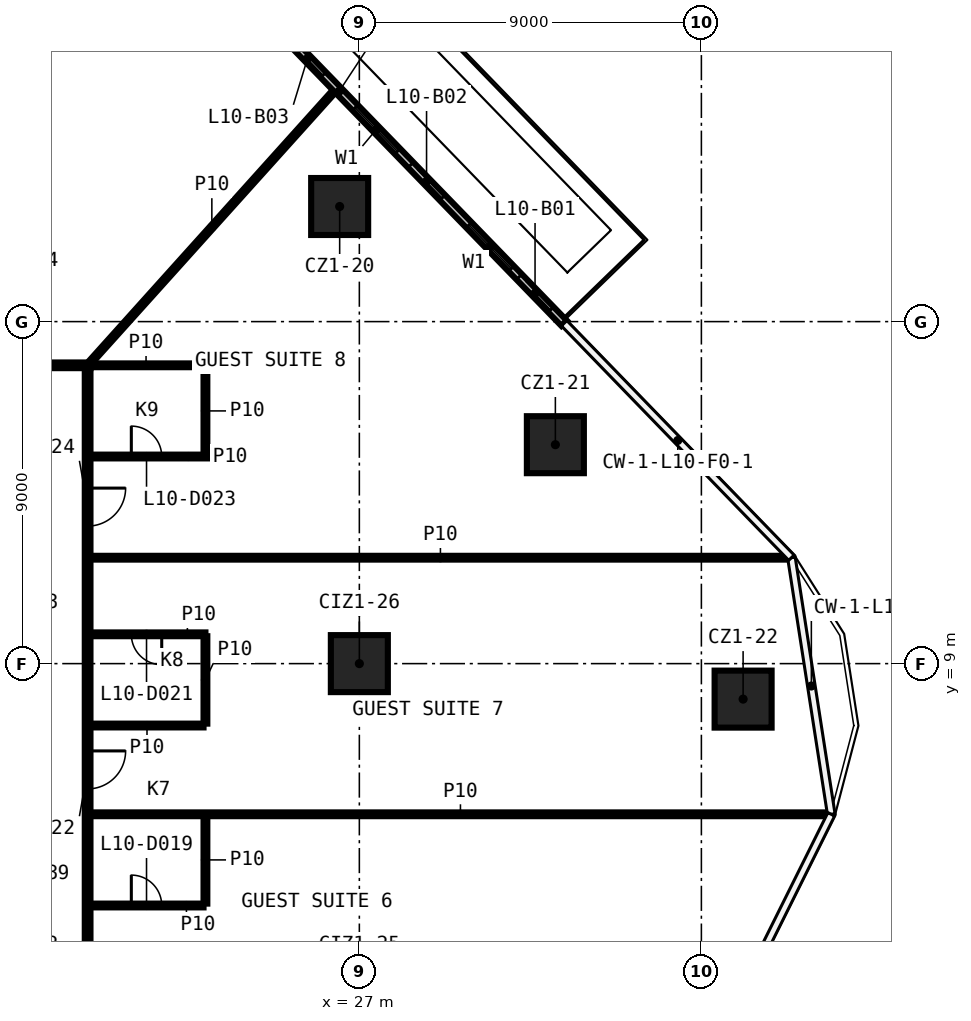
"""IFC4 building model, lengths in metres.
Left out: names, types, materials, properties, quantities, classifications, styles, units other than length and angle.
Written with IfcOpenShell. Run it as: python <this file> out.ifc"""

import sys

from ifc_helpers import new_model, si_unit, direction, frame, frame_2d, origin, origin_2d, place, context, subcontext, project, spatial, rectangle, extrude, element, fill, save


model = new_model("IFC4")
c1 = context("Model", 3, precision=1e-05, world=origin(), true_north=direction((0.0, 1.0)))
c2 = subcontext(c1, "Body", "Model", "MODEL_VIEW")
j1 = project(units=[si_unit("LENGTHUNIT", "METRE"), si_unit("PLANEANGLEUNIT", "RADIAN")], contexts=[c1])
p1 = place(None, origin())
s1 = spatial("IfcSite", under=j1, at=p1, CompositionType="ELEMENT")
p2 = place(p1, origin())
s2 = spatial("IfcBuilding", under=s1, at=p2, CompositionType="ELEMENT")
p3 = place(p2, frame((0.0, 0.0, 58.8)))
s3 = spatial("IfcBuildingStorey", under=s2, at=p3, CompositionType="ELEMENT", Elevation=58.8)
for number, where, z_axis, x_axis in (
    (1, (26.482, 21.029, 0.0), (0.0, 0.0, 1.0), (1.0, 0.0, 0.0)),
    (2, (32.158, 14.761, 0.0), (0.0, 0.0, 1.0), (1.0, 0.0, 0.0)),
    (3, (37.098, 8.066, 0.0), (0.0, 0.0, 1.0), (1.0, 0.0, 0.0)),
    (4, (27.0, 9.0, 0.0), (0.0, 0.0, 1.0), (1.0, 0.0, 0.0)),
):
    element("IfcColumn", number, at=place(p3, frame(where, z_axis=z_axis, x_axis=x_axis)), inside=s3, PredefinedType="COLUMN", context=c2, shape_type="SweptSolid", body=[
        extrude(rectangle(XDim=1.5, YDim=1.5, at=origin_2d()), origin(), (0.0, 0.0, 1.0), 3.3),
    ])
p4 = place(p3, frame((19.925, 2.635, 0.0), z_axis=(0.0, 0.0, 1.0), x_axis=(1.0, 0.0, 0.0)))
e5 = element("IfcWall", 5, at=p4, inside=s3, PredefinedType="PARTITIONING", context=c2, shape_type="SweptSolid", body=[
    extrude(rectangle(XDim=2.975, YDim=0.1, at=frame_2d((1.487, 0.0))), origin(), (0.0, 0.0, 1.0), 3.3),
])
p5 = place(p4, frame((1.075, 0.0, 0.0)))
e6 = element("IfcOpeningElement", 6, at=p5, cuts=e5, PredefinedType="OPENING", context=c2, shape_type="SweptSolid", body=[
    extrude(rectangle(XDim=0.8, YDim=2.1, at=frame_2d((0.4, 1.05))), frame((0.0, 0.06, 0.0), z_axis=(0.0, -1.0, 0.0), x_axis=(1.0, 0.0, 0.0)), (0.0, 0.0, 1.0), 0.12),
])
p6 = place(p3, frame((19.925, 5.035, 0.0), z_axis=(0.0, 0.0, 1.0), x_axis=(1.0, 0.0, 0.0)))
e7 = element("IfcWall", 7, at=p6, inside=s3, PredefinedType="PARTITIONING", context=c2, shape_type="SweptSolid", body=[
    extrude(rectangle(XDim=19.47, YDim=0.1, at=frame_2d((9.735, 0.0))), origin(), (0.0, 0.0, 1.0), 3.3),
])
p7 = place(p3, frame((19.925, 7.371, 0.0), z_axis=(0.0, 0.0, 1.0), x_axis=(1.0, 0.0, 0.0)))
e8 = element("IfcWall", 8, at=p7, inside=s3, PredefinedType="PARTITIONING", context=c2, shape_type="SweptSolid", body=[
    extrude(rectangle(XDim=2.975, YDim=0.1, at=frame_2d((1.487, 0.0))), origin(), (0.0, 0.0, 1.0), 3.3),
])
p8 = place(p3, frame((22.95, 9.771, 0.0), z_axis=(0.0, 0.0, 1.0), x_axis=(-1.0, 0.0, 0.0)))
e9 = element("IfcWall", 9, at=p8, inside=s3, PredefinedType="PARTITIONING", context=c2, shape_type="SweptSolid", body=[
    extrude(rectangle(XDim=3.025, YDim=0.1, at=frame_2d((1.512, 0.0))), origin(), (0.0, 0.0, 1.0), 3.3),
])
p9 = place(p8, frame((1.15, 0.0, 0.0)))
e10 = element("IfcOpeningElement", 10, at=p9, cuts=e9, PredefinedType="OPENING", context=c2, shape_type="SweptSolid", body=[
    extrude(rectangle(XDim=0.8, YDim=2.1, at=frame_2d((0.4, 1.05))), frame((0.0, 0.06, 0.0), z_axis=(0.0, -1.0, 0.0), x_axis=(1.0, 0.0, 0.0)), (0.0, 0.0, 1.0), 0.12),
])
p10 = place(p3, frame((19.925, 11.787, 0.0), z_axis=(0.0, 0.0, 1.0), x_axis=(1.0, 0.0, 0.0)))
e11 = element("IfcWall", 11, at=p10, inside=s3, PredefinedType="PARTITIONING", context=c2, shape_type="SweptSolid", body=[
    extrude(rectangle(XDim=18.417, YDim=0.1, at=frame_2d((9.208, 0.0))), origin(), (0.0, 0.0, 1.0), 3.3),
])
p11 = place(p3, frame((19.925, 14.45, 0.0), z_axis=(0.0, 0.0, 1.0), x_axis=(1.0, 0.0, 0.0)))
e12 = element("IfcWall", 12, at=p11, inside=s3, PredefinedType="PARTITIONING", context=c2, shape_type="SweptSolid", body=[
    extrude(rectangle(XDim=3.075, YDim=0.1, at=frame_2d((1.538, 0.0))), origin(), (0.0, 0.0, 1.0), 3.3),
])
p12 = place(p11, frame((1.075, 0.0, 0.0)))
e13 = element("IfcOpeningElement", 13, at=p12, cuts=e12, PredefinedType="OPENING", context=c2, shape_type="SweptSolid", body=[
    extrude(rectangle(XDim=0.8, YDim=2.1, at=frame_2d((0.4, 1.05))), frame((0.0, 0.06, 0.0), z_axis=(0.0, -1.0, 0.0), x_axis=(1.0, 0.0, 0.0)), (0.0, 0.0, 1.0), 0.12),
])
p13 = place(p3, frame((-19.925, 16.85, 0.0), z_axis=(0.0, 0.0, 1.0), x_axis=(1.0, 0.0, 0.0)))
e14 = element("IfcWall", 14, at=p13, inside=s3, PredefinedType="PARTITIONING", context=c2, shape_type="SweptSolid", body=[
    extrude(rectangle(XDim=39.85, YDim=0.15, at=frame_2d((19.925, 0.0))), origin(), (0.0, 0.0, 1.0), 3.3),
])
p14 = place(p13, frame((31.433, 0.0, 0.0)))
e15 = element("IfcOpeningElement", 15, at=p14, cuts=e14, PredefinedType="OPENING", context=c2, shape_type="SweptSolid", body=[
    extrude(rectangle(XDim=0.9, YDim=2.1, at=frame_2d((0.45, 1.05))), frame((0.0, 0.085, 0.0), z_axis=(0.0, -1.0, 0.0), x_axis=(1.0, 0.0, 0.0)), (0.0, 0.0, 1.0), 0.17),
])
p15 = place(p13, frame((22.043, 0.0, 0.0)))
e16 = element("IfcOpeningElement", 16, at=p15, cuts=e14, PredefinedType="OPENING", context=c2, shape_type="SweptSolid", body=[
    extrude(rectangle(XDim=0.9, YDim=2.1, at=frame_2d((0.45, 1.05))), frame((0.0, 0.085, 0.0), z_axis=(0.0, -1.0, 0.0), x_axis=(1.0, 0.0, 0.0)), (0.0, 0.0, 1.0), 0.17),
])
p16 = place(p13, frame((16.957, 0.0, 0.0)))
e17 = element("IfcOpeningElement", 17, at=p16, cuts=e14, PredefinedType="OPENING", context=c2, shape_type="SweptSolid", body=[
    extrude(rectangle(XDim=0.9, YDim=2.1, at=frame_2d((0.45, 1.05))), frame((0.0, 0.085, 0.0), z_axis=(0.0, -1.0, 0.0), x_axis=(1.0, 0.0, 0.0)), (0.0, 0.0, 1.0), 0.17),
])
p17 = place(p13, frame((13.572, 0.0, 0.0)))
e18 = element("IfcOpeningElement", 18, at=p17, cuts=e14, PredefinedType="OPENING", context=c2, shape_type="SweptSolid", body=[
    extrude(rectangle(XDim=0.9, YDim=2.1, at=frame_2d((0.45, 1.05))), frame((0.0, 0.085, 0.0), z_axis=(0.0, -1.0, 0.0), x_axis=(1.0, 0.0, 0.0)), (0.0, 0.0, 1.0), 0.17),
])
p18 = place(p13, frame((7.458, 0.0, 0.0)))
e19 = element("IfcOpeningElement", 19, at=p18, cuts=e14, PredefinedType="OPENING", context=c2, shape_type="SweptSolid", body=[
    extrude(rectangle(XDim=1.0, YDim=2.1, at=frame_2d((0.5, 1.05))), frame((0.0, 0.085, 0.0), z_axis=(0.0, -1.0, 0.0), x_axis=(1.0, 0.0, 0.0)), (0.0, 0.0, 1.0), 0.17),
])
p19 = place(p3, frame((19.775, 16.85, 0.0), z_axis=(0.0, 0.0, 1.0), x_axis=(1.0, 0.0, 0.0)))
e20 = element("IfcWall", 20, at=p19, inside=s3, PredefinedType="PARTITIONING", context=c2, shape_type="SweptSolid", body=[
    extrude(rectangle(XDim=3.225, YDim=0.1, at=frame_2d((1.613, 0.0))), origin(), (0.0, 0.0, 1.0), 3.3),
])
p20 = place(p3, frame((19.85, 16.85, 0.0), z_axis=(0.0, 0.0, 1.0), x_axis=(0.668734291705, 0.743501477536, 0.0)))
e21 = element("IfcWall", 21, at=p20, inside=s3, PredefinedType="PARTITIONING", context=c2, shape_type="SweptSolid", body=[
    extrude(rectangle(XDim=9.776, YDim=0.1, at=frame_2d((4.888, 0.0))), origin(), (0.0, 0.0, 1.0), 3.3),
])
for number, where, z_axis, x_axis in (
    (22, (22.95, 2.685, 0.0), (0.0, 0.0, 1.0), (0.0, 1.0, 0.0)),
    (23, (22.95, 7.421, 0.0), (0.0, 0.0, 1.0), (0.0, 1.0, 0.0)),
):
    element("IfcWall", number, at=place(p3, frame(where, z_axis=z_axis, x_axis=x_axis)), inside=s3, PredefinedType="PARTITIONING", context=c2, shape_type="SweptSolid", body=[
        extrude(rectangle(XDim=2.3, YDim=0.1, at=frame_2d((1.15, 0.0))), origin(), (0.0, 0.0, 1.0), 3.3),
    ])
p21 = place(p3, frame((22.95, 14.5, 0.0), z_axis=(0.0, 0.0, 1.0), x_axis=(0.0, 1.0, 0.0)))
e24 = element("IfcWall", 24, at=p21, inside=s3, PredefinedType="PARTITIONING", context=c2, shape_type="SweptSolid", body=[
    extrude(rectangle(XDim=2.3, YDim=0.1, at=frame_2d((1.15, 0.0))), origin(), (0.0, 0.0, 1.0), 3.3),
])
p22 = place(p3, frame((19.85, 16.775, 0.0), z_axis=(0.0, 0.0, 1.0), x_axis=(0.0, -1.0, 0.0)))
e25 = element("IfcWall", 25, at=p22, inside=s3, PredefinedType="PARTITIONING", context=c2, shape_type="SweptSolid", body=[
    extrude(rectangle(XDim=33.55, YDim=0.15, at=frame_2d((16.775, 0.0))), origin(), (0.0, 0.0, 1.0), 3.3),
])
p23 = place(p22, frame((32.158, 0.0, 0.0)))
e26 = element("IfcOpeningElement", 26, at=p23, cuts=e25, PredefinedType="OPENING", context=c2, shape_type="SweptSolid", body=[
    extrude(rectangle(XDim=1.0, YDim=2.1, at=frame_2d((0.5, 1.05))), frame((0.0, 0.085, 0.0), z_axis=(0.0, -1.0, 0.0), x_axis=(1.0, 0.0, 0.0)), (0.0, 0.0, 1.0), 0.17),
])
p24 = place(p22, frame((20.094, 0.0, 0.0)))
e27 = element("IfcOpeningElement", 27, at=p24, cuts=e25, PredefinedType="OPENING", context=c2, shape_type="SweptSolid", body=[
    extrude(rectangle(XDim=1.0, YDim=2.1, at=frame_2d((0.5, 1.05))), frame((0.0, 0.085, 0.0), z_axis=(0.0, -1.0, 0.0), x_axis=(1.0, 0.0, 0.0)), (0.0, 0.0, 1.0), 0.17),
])
p25 = place(p22, frame((18.428, 0.0, 0.0)))
e28 = element("IfcOpeningElement", 28, at=p25, cuts=e25, PredefinedType="OPENING", context=c2, shape_type="SweptSolid", body=[
    extrude(rectangle(XDim=1.0, YDim=2.1, at=frame_2d((0.5, 1.05))), frame((0.0, 0.085, 0.0), z_axis=(0.0, -1.0, 0.0), x_axis=(1.0, 0.0, 0.0)), (0.0, 0.0, 1.0), 0.17),
])
p26 = place(p22, frame((10.072, 0.0, 0.0)))
e29 = element("IfcOpeningElement", 29, at=p26, cuts=e25, PredefinedType="OPENING", context=c2, shape_type="SweptSolid", body=[
    extrude(rectangle(XDim=1.0, YDim=2.1, at=frame_2d((0.5, 1.05))), frame((0.0, 0.085, 0.0), z_axis=(0.0, -1.0, 0.0), x_axis=(1.0, 0.0, 0.0)), (0.0, 0.0, 1.0), 0.17),
])
p27 = place(p22, frame((3.156, 0.0, 0.0)))
e30 = element("IfcOpeningElement", 30, at=p27, cuts=e25, PredefinedType="OPENING", context=c2, shape_type="SweptSolid", body=[
    extrude(rectangle(XDim=1.0, YDim=2.1, at=frame_2d((0.5, 1.05))), frame((0.0, 0.085, 0.0), z_axis=(0.0, -1.0, 0.0), x_axis=(1.0, 0.0, 0.0)), (0.0, 0.0, 1.0), 0.17),
])
p28 = place(p3, frame((32.389, 17.957, 0.0), z_axis=(0.0, 0.0, 1.0), x_axis=(-0.696038792441, 0.718004177855, 0.0)))
e31 = element("IfcWall", 31, at=p28, inside=s3, PredefinedType="SOLIDWALL", context=c2, shape_type="SweptSolid", body=[
    extrude(rectangle(XDim=17.206, YDim=0.2, at=frame_2d((8.603, 0.0))), origin(), (0.0, 0.0, 1.0), 3.3),
])
p29 = place(p28, frame((2.0, 0.0, 0.6)))
e32 = element("IfcOpeningElement", 32, at=p29, cuts=e31, PredefinedType="OPENING", context=c2, shape_type="SweptSolid", body=[
    extrude(rectangle(XDim=1.6, YDim=2.4, at=frame_2d((0.8, 1.2))), frame((0.0, 0.11, 0.0), z_axis=(0.0, -1.0, 0.0), x_axis=(1.0, 0.0, 0.0)), (0.0, 0.0, 1.0), 0.22),
])
p30 = place(p28, frame((0.5, 0.0, 0.0)))
e33 = element("IfcOpeningElement", 33, at=p30, cuts=e31, PredefinedType="OPENING", context=c2, shape_type="SweptSolid", body=[
    extrude(rectangle(XDim=1.2, YDim=2.4, at=frame_2d((0.6, 1.2))), frame((0.0, 0.11, 0.0), z_axis=(0.0, -1.0, 0.0), x_axis=(1.0, 0.0, 0.0)), (0.0, 0.0, 1.0), 0.22),
])
p31 = place(p28, frame((6.302, 0.0, 0.6)))
e34 = element("IfcOpeningElement", 34, at=p31, cuts=e31, PredefinedType="OPENING", context=c2, shape_type="SweptSolid", body=[
    extrude(rectangle(XDim=1.6, YDim=2.4, at=frame_2d((0.8, 1.2))), frame((0.0, 0.11, 0.0), z_axis=(0.0, -1.0, 0.0), x_axis=(1.0, 0.0, 0.0)), (0.0, 0.0, 1.0), 0.22),
])
p32 = place(p28, frame((4.601, 0.0, 0.0)))
e35 = element("IfcOpeningElement", 35, at=p32, cuts=e31, PredefinedType="OPENING", context=c2, shape_type="SweptSolid", body=[
    extrude(rectangle(XDim=1.2, YDim=2.4, at=frame_2d((0.6, 1.2))), frame((0.0, 0.11, 0.0), z_axis=(0.0, -1.0, 0.0), x_axis=(1.0, 0.0, 0.0)), (0.0, 0.0, 1.0), 0.22),
])
p33 = place(p28, frame((10.603, 0.0, 0.6)))
e36 = element("IfcOpeningElement", 36, at=p33, cuts=e31, PredefinedType="OPENING", context=c2, shape_type="SweptSolid", body=[
    extrude(rectangle(XDim=1.6, YDim=2.4, at=frame_2d((0.8, 1.2))), frame((0.0, 0.11, 0.0), z_axis=(0.0, -1.0, 0.0), x_axis=(1.0, 0.0, 0.0)), (0.0, 0.0, 1.0), 0.22),
])
p34 = place(p28, frame((9.103, 0.0, 0.0)))
e37 = element("IfcOpeningElement", 37, at=p34, cuts=e31, PredefinedType="OPENING", context=c2, shape_type="SweptSolid", body=[
    extrude(rectangle(XDim=1.2, YDim=2.4, at=frame_2d((0.6, 1.2))), frame((0.0, 0.11, 0.0), z_axis=(0.0, -1.0, 0.0), x_axis=(1.0, 0.0, 0.0)), (0.0, 0.0, 1.0), 0.22),
])
p35 = place(p28, frame((13.404, 0.0, 0.6)))
e38 = element("IfcOpeningElement", 38, at=p35, cuts=e31, PredefinedType="OPENING", context=c2, shape_type="SweptSolid", body=[
    extrude(rectangle(XDim=1.6, YDim=2.4, at=frame_2d((0.8, 1.2))), frame((0.0, 0.11, 0.0), z_axis=(0.0, -1.0, 0.0), x_axis=(1.0, 0.0, 0.0)), (0.0, 0.0, 1.0), 0.22),
])
p36 = place(p28, frame((15.504, 0.0, 0.0)))
e39 = element("IfcOpeningElement", 39, at=p36, cuts=e31, PredefinedType="OPENING", context=c2, shape_type="SweptSolid", body=[
    extrude(rectangle(XDim=1.2, YDim=2.4, at=frame_2d((0.6, 1.2))), frame((0.0, 0.11, 0.0), z_axis=(0.0, -1.0, 0.0), x_axis=(1.0, 0.0, 0.0)), (0.0, 0.0, 1.0), 0.22),
])
p37 = place(p5, origin())
e40 = element("IfcDoor", 40, at=p37, inside=s3, OperationType="SINGLE_SWING_RIGHT", PredefinedType="DOOR", context=c2, shape_type="SweptSolid", body=[
    extrude(rectangle(XDim=0.8, YDim=2.1, at=frame_2d((0.4, 1.05))), frame((0.0, 0.025, 0.0), z_axis=(0.0, -1.0, 0.0), x_axis=(1.0, 0.0, 0.0)), (0.0, 0.0, 1.0), 0.05),
])
fill(e6, e40)
p38 = place(p9, origin())
e41 = element("IfcDoor", 41, at=p38, inside=s3, OperationType="SINGLE_SWING_LEFT", PredefinedType="DOOR", context=c2, shape_type="SweptSolid", body=[
    extrude(rectangle(XDim=0.8, YDim=2.1, at=frame_2d((0.4, 1.05))), frame((0.0, 0.025, 0.0), z_axis=(0.0, -1.0, 0.0), x_axis=(1.0, 0.0, 0.0)), (0.0, 0.0, 1.0), 0.05),
])
fill(e10, e41)
p39 = place(p26, origin())
e42 = element("IfcDoor", 42, at=p39, inside=s3, OperationType="SINGLE_SWING_RIGHT", PredefinedType="DOOR", context=c2, shape_type="SweptSolid", body=[
    extrude(rectangle(XDim=1.0, YDim=2.1, at=frame_2d((0.5, 1.05))), frame((0.0, 0.025, 0.0), z_axis=(0.0, -1.0, 0.0), x_axis=(1.0, 0.0, 0.0)), (0.0, 0.0, 1.0), 0.05),
])
fill(e29, e42)
p40 = place(p12, origin())
e43 = element("IfcDoor", 43, at=p40, inside=s3, OperationType="SINGLE_SWING_RIGHT", PredefinedType="DOOR", context=c2, shape_type="SweptSolid", body=[
    extrude(rectangle(XDim=0.8, YDim=2.1, at=frame_2d((0.4, 1.05))), frame((0.0, 0.025, 0.0), z_axis=(0.0, -1.0, 0.0), x_axis=(1.0, 0.0, 0.0)), (0.0, 0.0, 1.0), 0.05),
])
fill(e13, e43)
p41 = place(p27, origin())
e44 = element("IfcDoor", 44, at=p41, inside=s3, OperationType="SINGLE_SWING_LEFT", PredefinedType="DOOR", context=c2, shape_type="SweptSolid", body=[
    extrude(rectangle(XDim=1.0, YDim=2.1, at=frame_2d((0.5, 1.05))), frame((0.0, 0.025, 0.0), z_axis=(0.0, -1.0, 0.0), x_axis=(1.0, 0.0, 0.0)), (0.0, 0.0, 1.0), 0.05),
])
fill(e30, e44)
p42 = place(p29, origin())
e45 = element("IfcWindow", 45, at=p42, inside=s3, PartitioningType="SINGLE_PANEL", PredefinedType="WINDOW", context=c2, shape_type="SweptSolid", body=[
    extrude(rectangle(XDim=1.6, YDim=2.4, at=frame_2d((0.8, 1.2))), frame((0.0, 0.03, 0.0), z_axis=(0.0, -1.0, 0.0), x_axis=(1.0, 0.0, 0.0)), (0.0, 0.0, 1.0), 0.06),
])
fill(e32, e45)
p43 = place(p30, origin())
e46 = element("IfcDoor", 46, at=p43, inside=s3, OperationType="SLIDING_TO_LEFT", PredefinedType="DOOR", context=c2, shape_type="SweptSolid", body=[
    extrude(rectangle(XDim=1.2, YDim=2.4, at=frame_2d((0.6, 1.2))), frame((0.0, 0.025, 0.0), z_axis=(0.0, -1.0, 0.0), x_axis=(1.0, 0.0, 0.0)), (0.0, 0.0, 1.0), 0.05),
])
fill(e33, e46)
p44 = place(p31, origin())
e47 = element("IfcWindow", 47, at=p44, inside=s3, PartitioningType="SINGLE_PANEL", PredefinedType="WINDOW", context=c2, shape_type="SweptSolid", body=[
    extrude(rectangle(XDim=1.6, YDim=2.4, at=frame_2d((0.8, 1.2))), frame((0.0, 0.03, 0.0), z_axis=(0.0, -1.0, 0.0), x_axis=(1.0, 0.0, 0.0)), (0.0, 0.0, 1.0), 0.06),
])
fill(e34, e47)
p45 = place(p32, origin())
e48 = element("IfcDoor", 48, at=p45, inside=s3, OperationType="SLIDING_TO_LEFT", PredefinedType="DOOR", context=c2, shape_type="SweptSolid", body=[
    extrude(rectangle(XDim=1.2, YDim=2.4, at=frame_2d((0.6, 1.2))), frame((0.0, 0.025, 0.0), z_axis=(0.0, -1.0, 0.0), x_axis=(1.0, 0.0, 0.0)), (0.0, 0.0, 1.0), 0.05),
])
fill(e35, e48)
p46 = place(p34, origin())
e49 = element("IfcDoor", 49, at=p46, inside=s3, OperationType="SLIDING_TO_LEFT", PredefinedType="DOOR", context=c2, shape_type="SweptSolid", body=[
    extrude(rectangle(XDim=1.2, YDim=2.4, at=frame_2d((0.6, 1.2))), frame((0.0, 0.025, 0.0), z_axis=(0.0, -1.0, 0.0), x_axis=(1.0, 0.0, 0.0)), (0.0, 0.0, 1.0), 0.05),
])
fill(e37, e49)
save(model, sys.argv[1])
